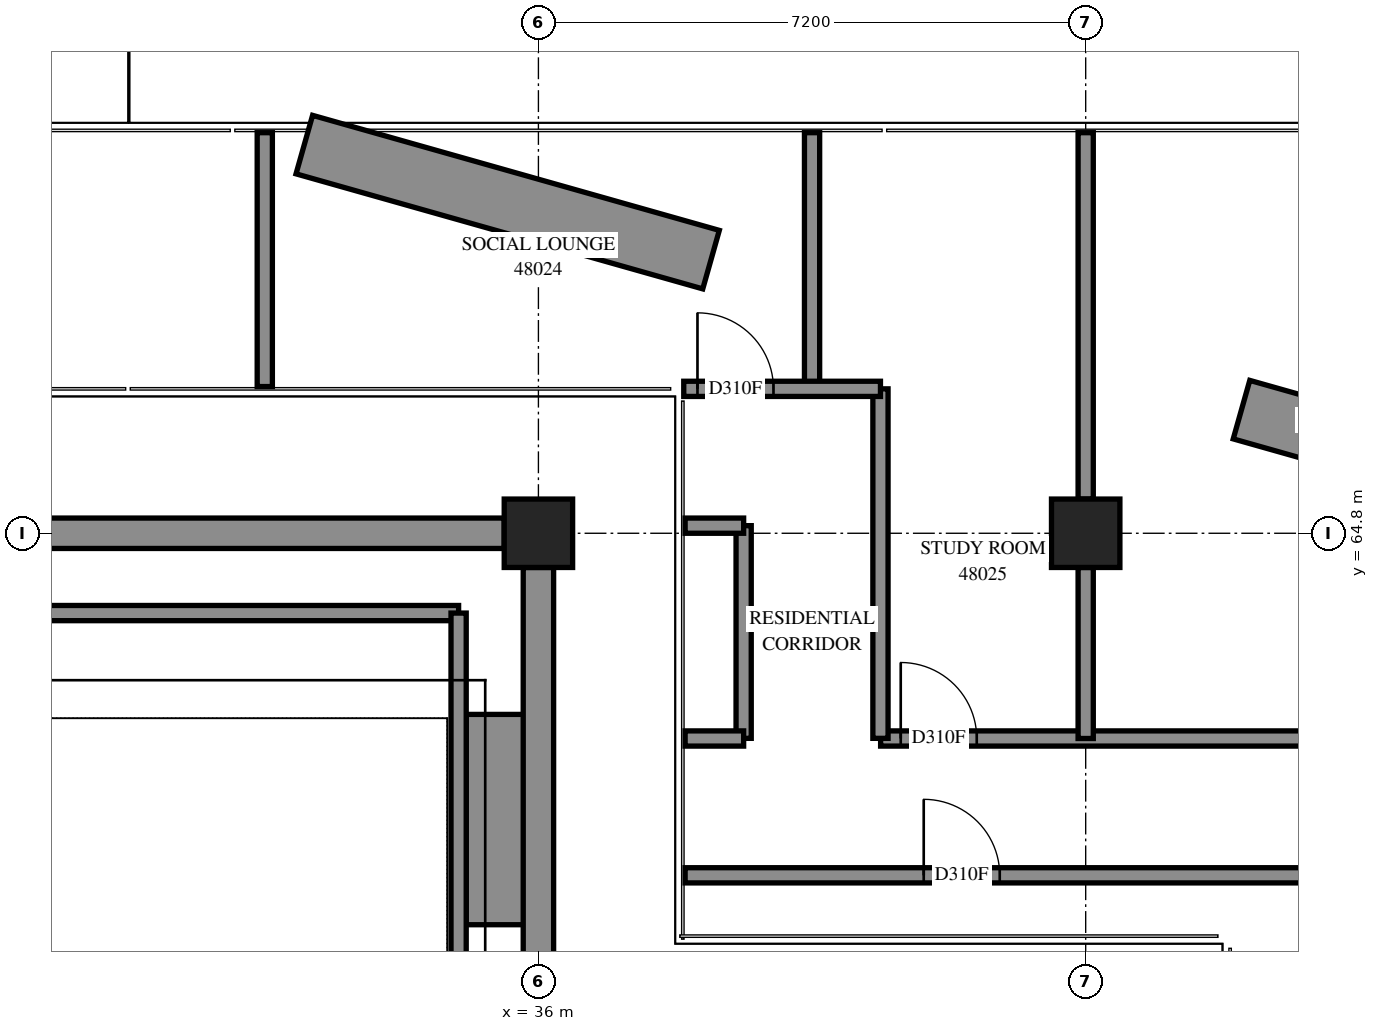
"""IFC4 building model, lengths in metres.
Left out: names, types, materials, properties, quantities, classifications, styles, units other than length and angle.
Written with IfcOpenShell. Run it as: python <this file> out.ifc"""

import sys

from ifc_helpers import new_model, si_unit, direction, frame, frame_2d, origin, origin_2d, place, context, subcontext, project, spatial, polyline, rectangle, outline, extrude, element, fill, save


model = new_model("IFC4")
c1 = context("Model", 3, precision=1e-05, world=origin(), true_north=direction((0.0, 1.0)))
c2 = subcontext(c1, "Body", "Model", "MODEL_VIEW")
j1 = project(units=[si_unit("LENGTHUNIT", "METRE"), si_unit("PLANEANGLEUNIT", "RADIAN")], contexts=[c1])
p1 = place(None, origin())
s1 = spatial("IfcSite", under=j1, at=p1, CompositionType="ELEMENT")
p2 = place(p1, origin())
s2 = spatial("IfcBuilding", under=s1, at=p2, CompositionType="ELEMENT")
p3 = place(p2, frame((0.0, 0.0, 176.2)))
s3 = spatial("IfcBuildingStorey", under=s2, at=p3, CompositionType="ELEMENT", Elevation=176.2)
for number, where, z_axis, x_axis in (
    (1, (36.0, 64.8, 0.0), (0.0, 0.0, 1.0), (1.0, 0.0, 0.0)),
    (2, (43.2, 64.8, 0.0), (0.0, 0.0, 1.0), (1.0, 0.0, 0.0)),
):
    element("IfcColumn", number, at=place(p3, frame(where, z_axis=z_axis, x_axis=x_axis)), inside=s3, PredefinedType="COLUMN", context=c2, shape_type="SweptSolid", body=[
        extrude(rectangle(XDim=0.9, YDim=0.9, at=origin_2d()), origin(), (0.0, 0.0, 1.0), 3.9),
    ])
p4 = place(p3, frame((35.45, 62.417, 0.0), z_axis=(0.0, 0.0, 1.0), x_axis=(0.0, -1.0, 0.0)))
e3 = element("IfcWall", 3, at=p4, inside=s3, PredefinedType="SOLIDWALL", context=c2, shape_type="SweptSolid", body=[
    extrude(rectangle(XDim=2.767, YDim=0.8, at=frame_2d((1.383, 0.0))), origin(), (0.0, 0.0, 1.0), 0.65),
])
p5 = place(p3, frame((38.271, 68.4, 0.0), z_axis=(0.0, 0.0, 1.0), x_axis=(-0.96225946, 0.2721336649, 0.0)))
e4 = element("IfcWall", 4, at=p5, inside=s3, PredefinedType="SOLIDWALL", context=c2, shape_type="SweptSolid", body=[
    extrude(rectangle(XDim=5.561, YDim=0.8, at=frame_2d((2.78, 0.0))), origin(), (0.0, 0.0, 1.0), 0.65),
])
p6 = place(p3, frame((20.55, 63.75, 0.0), z_axis=(0.0, 0.0, 1.0), x_axis=(1.0, 0.0, 0.0)))
e5 = element("IfcWall", 5, at=p6, inside=s3, PredefinedType="SOLIDWALL", context=c2, shape_type="SweptSolid", body=[
    extrude(outline(polyline([(-0.1, -0.1), (14.3, -0.1), (14.5, 0.1), (0.1, 0.1), (-0.1, -0.1)])), origin(), (0.0, 0.0, 1.0), 4.2),
])
p7 = place(p3, frame((34.95, 63.75, 0.0), z_axis=(0.0, 0.0, 1.0), x_axis=(0.0, -1.0, 0.0)))
e6 = element("IfcWall", 6, at=p7, inside=s3, PredefinedType="SOLIDWALL", context=c2, shape_type="SweptSolid", body=[
    extrude(outline(polyline([(0.1, -0.1), (7.3, -0.1), (7.1, 0.1), (-0.1, 0.1), (0.1, -0.1)])), origin(), (0.0, 0.0, 1.0), 4.2),
])
p8 = place(p3, frame((37.93, 60.3, 0.0), z_axis=(0.0, 0.0, 1.0), x_axis=(1.0, 0.0, 0.0)))
e7 = element("IfcWall", 7, at=p8, inside=s3, PredefinedType="PARTITIONING", context=c2, shape_type="SweptSolid", body=[
    extrude(rectangle(XDim=15.17, YDim=0.2, at=frame_2d((7.585, 0.0))), origin(), (0.0, 0.0, 1.0), 3.9),
])
p9 = place(p8, frame((3.139, 0.0, 0.0)))
e8 = element("IfcOpeningElement", 8, at=p9, cuts=e7, PredefinedType="OPENING", context=c2, shape_type="SweptSolid", body=[
    extrude(rectangle(XDim=1.0, YDim=2.1, at=frame_2d((0.5, 1.05))), frame((0.0, 0.11, 0.0), z_axis=(0.0, -1.0, 0.0), x_axis=(1.0, 0.0, 0.0)), (0.0, 0.0, 1.0), 0.22),
])
p10 = place(p8, frame((9.705, 0.0, 0.0)))
e9 = element("IfcOpeningElement", 9, at=p10, cuts=e7, PredefinedType="OPENING", context=c2, shape_type="SweptSolid", body=[
    extrude(rectangle(XDim=1.0, YDim=2.1, at=frame_2d((0.5, 1.05))), frame((0.0, 0.11, 0.0), z_axis=(0.0, -1.0, 0.0), x_axis=(1.0, 0.0, 0.0)), (0.0, 0.0, 1.0), 0.22),
])
p11 = place(p8, frame((14.026, 0.0, 0.0)))
e10 = element("IfcOpeningElement", 10, at=p11, cuts=e7, PredefinedType="OPENING", context=c2, shape_type="SweptSolid", body=[
    extrude(rectangle(XDim=1.0, YDim=2.1, at=frame_2d((0.5, 1.05))), frame((0.0, 0.11, 0.0), z_axis=(0.0, -1.0, 0.0), x_axis=(1.0, 0.0, 0.0)), (0.0, 0.0, 1.0), 0.22),
])
p12 = place(p3, frame((40.502, 62.1, 0.0), z_axis=(0.0, 0.0, 1.0), x_axis=(1.0, 0.0, 0.0)))
e11 = element("IfcWall", 11, at=p12, inside=s3, PredefinedType="PARTITIONING", context=c2, shape_type="SweptSolid", body=[
    extrude(rectangle(XDim=14.748, YDim=0.2, at=frame_2d((7.374, 0.0))), origin(), (0.0, 0.0, 1.0), 3.9),
])
p13 = place(p12, frame((0.265, 0.0, 0.0)))
e12 = element("IfcOpeningElement", 12, at=p13, cuts=e11, PredefinedType="OPENING", context=c2, shape_type="SweptSolid", body=[
    extrude(rectangle(XDim=1.0, YDim=2.1, at=frame_2d((0.5, 1.05))), frame((0.0, 0.11, 0.0), z_axis=(0.0, -1.0, 0.0), x_axis=(1.0, 0.0, 0.0)), (0.0, 0.0, 1.0), 0.22),
])
p14 = place(p12, frame((6.561, 0.0, 0.0)))
e13 = element("IfcOpeningElement", 13, at=p14, cuts=e11, PredefinedType="OPENING", context=c2, shape_type="SweptSolid", body=[
    extrude(rectangle(XDim=1.0, YDim=2.1, at=frame_2d((0.5, 1.05))), frame((0.0, 0.11, 0.0), z_axis=(0.0, -1.0, 0.0), x_axis=(1.0, 0.0, 0.0)), (0.0, 0.0, 1.0), 0.22),
])
p15 = place(p12, frame((11.991, 0.0, 0.0)))
e14 = element("IfcOpeningElement", 14, at=p15, cuts=e11, PredefinedType="OPENING", context=c2, shape_type="SweptSolid", body=[
    extrude(rectangle(XDim=1.0, YDim=2.1, at=frame_2d((0.5, 1.05))), frame((0.0, 0.11, 0.0), z_axis=(0.0, -1.0, 0.0), x_axis=(1.0, 0.0, 0.0)), (0.0, 0.0, 1.0), 0.22),
])
p16 = place(p3, frame((43.2, 65.25, 0.0), z_axis=(0.0, 0.0, 1.0), x_axis=(0.0, 1.0, 0.0)))
e15 = element("IfcWall", 15, at=p16, inside=s3, PredefinedType="PARTITIONING", context=c2, shape_type="SweptSolid", body=[
    extrude(rectangle(XDim=4.82, YDim=0.2, at=frame_2d((2.41, 0.0))), origin(), (0.0, 0.0, 1.0), 3.9),
])
p17 = place(p3, frame((40.5, 62.102, 0.0), z_axis=(0.0, 0.0, 1.0), x_axis=(0.0, 1.0, 0.0)))
e16 = element("IfcWall", 16, at=p17, inside=s3, PredefinedType="PARTITIONING", context=c2, shape_type="SweptSolid", body=[
    extrude(rectangle(XDim=4.598, YDim=0.2, at=frame_2d((2.299, 0.0))), origin(), (0.0, 0.0, 1.0), 3.9),
])
p18 = place(p3, frame((39.6, 66.7, 0.0), z_axis=(0.0, 0.0, 1.0), x_axis=(0.0, 1.0, 0.0)))
e17 = element("IfcWall", 17, at=p18, inside=s3, PredefinedType="PARTITIONING", context=c2, shape_type="SweptSolid", body=[
    extrude(rectangle(XDim=3.37, YDim=0.2, at=frame_2d((1.685, 0.0))), origin(), (0.0, 0.0, 1.0), 3.9),
])
p19 = place(p3, frame((32.4, 66.73, 0.0), z_axis=(0.0, 0.0, 1.0), x_axis=(0.0, 1.0, 0.0)))
e18 = element("IfcWall", 18, at=p19, inside=s3, PredefinedType="PARTITIONING", context=c2, shape_type="SweptSolid", body=[
    extrude(rectangle(XDim=3.34, YDim=0.2, at=frame_2d((1.67, 0.0))), origin(), (0.0, 0.0, 1.0), 3.9),
])
p20 = place(p3, frame((38.7, 62.102, 0.0), z_axis=(0.0, 0.0, 1.0), x_axis=(0.0, 1.0, 0.0)))
e19 = element("IfcWall", 19, at=p20, inside=s3, PredefinedType="PARTITIONING", context=c2, shape_type="SweptSolid", body=[
    extrude(rectangle(XDim=2.798, YDim=0.2, at=frame_2d((1.399, 0.0))), origin(), (0.0, 0.0, 1.0), 3.9),
])
p21 = place(p3, frame((37.912, 66.7, 0.0), z_axis=(0.0, 0.0, 1.0), x_axis=(1.0, 0.0, 0.0)))
e20 = element("IfcWall", 20, at=p21, inside=s3, PredefinedType="PARTITIONING", context=c2, shape_type="SweptSolid", body=[
    extrude(rectangle(XDim=2.588, YDim=0.2, at=frame_2d((1.294, 0.0))), origin(), (0.0, 0.0, 1.0), 3.9),
])
p22 = place(p21, frame((0.18, 0.0, 0.0)))
e21 = element("IfcOpeningElement", 21, at=p22, cuts=e20, PredefinedType="OPENING", context=c2, shape_type="SweptSolid", body=[
    extrude(rectangle(XDim=1.0, YDim=2.1, at=frame_2d((0.5, 1.05))), frame((0.0, 0.11, 0.0), z_axis=(0.0, -1.0, 0.0), x_axis=(1.0, 0.0, 0.0)), (0.0, 0.0, 1.0), 0.22),
])
p23 = place(p3, frame((43.2, 62.1, 0.0), z_axis=(0.0, 0.0, 1.0), x_axis=(0.0, 1.0, 0.0)))
e22 = element("IfcWall", 22, at=p23, inside=s3, PredefinedType="PARTITIONING", context=c2, shape_type="SweptSolid", body=[
    extrude(rectangle(XDim=2.25, YDim=0.2, at=frame_2d((1.125, 0.0))), origin(), (0.0, 0.0, 1.0), 3.9),
])
for number, where, z_axis, x_axis in (
    (23, (37.93, 62.1, 0.0), (0.0, 0.0, 1.0), (1.0, 0.0, 0.0)),
    (24, (37.93, 64.9, 0.0), (0.0, 0.0, 1.0), (1.0, 0.0, 0.0)),
):
    element("IfcWall", number, at=place(p3, frame(where, z_axis=z_axis, x_axis=x_axis)), inside=s3, PredefinedType="PARTITIONING", context=c2, shape_type="SweptSolid", body=[
        extrude(rectangle(XDim=0.77, YDim=0.2, at=frame_2d((0.385, 0.0))), origin(), (0.0, 0.0, 1.0), 3.9),
    ])
p24 = place(p3, frame((48.35, 65.55, 0.0), z_axis=(0.0, 0.0, 1.0), x_axis=(-0.9622595861, 0.2721332191, 0.0)))
e25 = element("IfcWall", 25, at=p24, inside=s3, PredefinedType="SOLIDWALL", context=c2, shape_type="SweptSolid", body=[
    extrude(outline(polyline([(0.0, -0.4), (3.222, -0.4), (3.222, 0.4), (0.0, 0.4), (0.0, -0.4)])), origin(), (0.0, 0.0, 1.0), 0.65),
])
p25 = place(p9, origin())
e26 = element("IfcDoor", 26, at=p25, inside=s3, OperationType="SINGLE_SWING_RIGHT", PredefinedType="DOOR", context=c2, shape_type="SweptSolid", body=[
    extrude(rectangle(XDim=1.0, YDim=2.1, at=frame_2d((0.5, 1.05))), frame((0.0, 0.025, 0.0), z_axis=(0.0, -1.0, 0.0), x_axis=(1.0, 0.0, 0.0)), (0.0, 0.0, 1.0), 0.05),
])
fill(e8, e26)
p26 = place(p22, origin())
e27 = element("IfcDoor", 27, at=p26, inside=s3, OperationType="SINGLE_SWING_LEFT", PredefinedType="DOOR", context=c2, shape_type="SweptSolid", body=[
    extrude(rectangle(XDim=1.0, YDim=2.1, at=frame_2d((0.5, 1.05))), frame((0.0, 0.025, 0.0), z_axis=(0.0, -1.0, 0.0), x_axis=(1.0, 0.0, 0.0)), (0.0, 0.0, 1.0), 0.05),
])
fill(e21, e27)
p27 = place(p13, origin())
e28 = element("IfcDoor", 28, at=p27, inside=s3, OperationType="SINGLE_SWING_LEFT", PredefinedType="DOOR", context=c2, shape_type="SweptSolid", body=[
    extrude(rectangle(XDim=1.0, YDim=2.1, at=frame_2d((0.5, 1.05))), frame((0.0, 0.025, 0.0), z_axis=(0.0, -1.0, 0.0), x_axis=(1.0, 0.0, 0.0)), (0.0, 0.0, 1.0), 0.05),
])
fill(e12, e28)
save(model, sys.argv[1])
